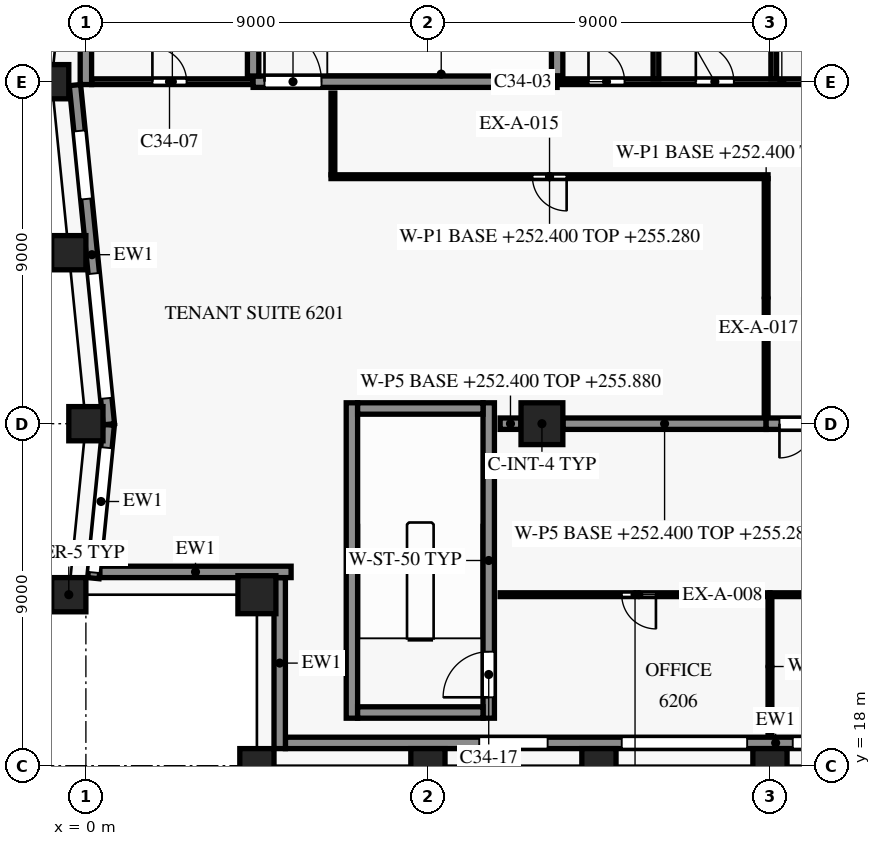
"""IFC4 building model, lengths in metres.
Left out: names, types, materials, properties, quantities, classifications, styles, units other than length and angle.
Written with IfcOpenShell. Run it as: python <this file> out.ifc"""

import sys

from ifc_helpers import new_model, si_unit, direction, frame, frame_2d, origin, origin_2d, place, context, subcontext, project, spatial, rectangle, extrude, element, fill, save


model = new_model("IFC4")
c1 = context("Model", 3, precision=1e-05, world=origin(), true_north=direction((0.0, 1.0)))
c2 = subcontext(c1, "Body", "Model", "MODEL_VIEW")
j1 = project(units=[si_unit("LENGTHUNIT", "METRE"), si_unit("PLANEANGLEUNIT", "RADIAN")], contexts=[c1])
p1 = place(None, origin())
s1 = spatial("IfcSite", under=j1, at=p1, CompositionType="ELEMENT")
p2 = place(p1, origin())
s2 = spatial("IfcBuilding", under=s1, at=p2, CompositionType="ELEMENT")
p3 = place(p2, frame((0.0, 0.0, 252.4)))
s3 = spatial("IfcBuildingStorey", under=s2, at=p3, CompositionType="ELEMENT", Elevation=252.4)
for number, where, z_axis, x_axis in (
    (1, (4.5, 18.0, 0.0), (0.0, 0.0, 1.0), (1.0, 0.0, 0.0)),
    (2, (9.0, 18.0, 0.0), (0.0, 0.0, 1.0), (1.0, 0.0, 0.0)),
    (3, (13.5, 18.0, 0.0), (0.0, 0.0, 1.0), (1.0, 0.0, 0.0)),
    (4, (18.0, 18.0, 0.0), (0.0, 0.0, 1.0), (1.0, 0.0, 0.0)),
    (5, (-0.9, 36.0, 0.0), (0.0, 0.0, 1.0), (0.0, -1.0, 0.0)),
    (6, (-0.45, 31.5, 0.0), (0.0, 0.0, 1.0), (0.1, -0.995, 0.0)),
    (7, (0.0, 27.0, 0.0), (0.0, 0.0, 1.0), (0.0, -1.0, 0.0)),
    (8, (-0.45, 22.5, 0.0), (0.0, 0.0, 1.0), (-0.1, -0.995, 0.0)),
):
    element("IfcColumn", number, at=place(p3, frame(where, z_axis=z_axis, x_axis=x_axis)), inside=s3, PredefinedType="COLUMN", context=c2, shape_type="SweptSolid", body=[
        extrude(rectangle(XDim=0.9, YDim=0.9, at=origin_2d()), origin(), (0.0, 0.0, 1.0), 3.8),
    ])
p4 = place(p3, frame((4.5, 22.5, 0.0), z_axis=(0.0, 0.0, 1.0), x_axis=(1.0, 0.0, 0.0)))
e9 = element("IfcColumn", 9, at=p4, inside=s3, PredefinedType="COLUMN", context=c2, shape_type="SweptSolid", body=[
    extrude(rectangle(XDim=1.0, YDim=1.0, at=origin_2d()), origin(), (0.0, 0.0, 1.0), 3.8),
])
p5 = place(p3, frame((12.0, 27.0, 0.0), z_axis=(0.0, 0.0, 1.0), x_axis=(1.0, 0.0, 0.0)))
e10 = element("IfcColumn", 10, at=p5, inside=s3, PredefinedType="COLUMN", context=c2, shape_type="SweptSolid", body=[
    extrude(rectangle(XDim=1.1, YDim=1.1, at=origin_2d()), origin(), (0.0, 0.0, 1.0), 3.8),
])
p6 = place(p3, frame((31.05, 18.6, 0.0), z_axis=(0.0, 0.0, 1.0), x_axis=(-1.0, 0.0, 0.0)))
e11 = element("IfcWall", 11, at=p6, inside=s3, PredefinedType="SOLIDWALL", context=c2, shape_type="SweptSolid", body=[
    extrude(rectangle(XDim=25.8, YDim=0.3, at=frame_2d((12.9, 0.0))), origin(), (0.0, 0.0, 1.0), 3.15),
])
p7 = place(p6, frame((0.9, 0.0, 0.75)))
e12 = element("IfcOpeningElement", 12, at=p7, cuts=e11, PredefinedType="OPENING", context=c2, shape_type="SweptSolid", body=[
    extrude(rectangle(XDim=1.8, YDim=1.8, at=frame_2d((0.9, 0.9))), frame((0.0, 0.16, 0.0), z_axis=(0.0, -1.0, 0.0), x_axis=(1.0, 0.0, 0.0)), (0.0, 0.0, 1.0), 0.32),
])
p8 = place(p6, frame((5.4, 0.0, 0.75)))
e13 = element("IfcOpeningElement", 13, at=p8, cuts=e11, PredefinedType="OPENING", context=c2, shape_type="SweptSolid", body=[
    extrude(rectangle(XDim=1.8, YDim=1.8, at=frame_2d((0.9, 0.9))), frame((0.0, 0.16, 0.0), z_axis=(0.0, -1.0, 0.0), x_axis=(1.0, 0.0, 0.0)), (0.0, 0.0, 1.0), 0.32),
])
p9 = place(p6, frame((9.15, 0.0, 0.15)))
e14 = element("IfcOpeningElement", 14, at=p9, cuts=e11, PredefinedType="OPENING", context=c2, shape_type="SweptSolid", body=[
    extrude(rectangle(XDim=3.3, YDim=2.4, at=frame_2d((1.65, 1.2))), frame((0.0, 0.16, 0.0), z_axis=(0.0, -1.0, 0.0), x_axis=(1.0, 0.0, 0.0)), (0.0, 0.0, 1.0), 0.32),
])
p10 = place(p6, frame((13.65, 0.0, 0.15)))
e15 = element("IfcOpeningElement", 15, at=p10, cuts=e11, PredefinedType="OPENING", context=c2, shape_type="SweptSolid", body=[
    extrude(rectangle(XDim=3.3, YDim=2.4, at=frame_2d((1.65, 1.2))), frame((0.0, 0.16, 0.0), z_axis=(0.0, -1.0, 0.0), x_axis=(1.0, 0.0, 0.0)), (0.0, 0.0, 1.0), 0.32),
])
p11 = place(p6, frame((18.9, 0.0, 0.75)))
e16 = element("IfcOpeningElement", 16, at=p11, cuts=e11, PredefinedType="OPENING", context=c2, shape_type="SweptSolid", body=[
    extrude(rectangle(XDim=1.8, YDim=1.8, at=frame_2d((0.9, 0.9))), frame((0.0, 0.16, 0.0), z_axis=(0.0, -1.0, 0.0), x_axis=(1.0, 0.0, 0.0)), (0.0, 0.0, 1.0), 0.32),
])
p12 = place(p3, frame((0.604, 26.985, 0.0), z_axis=(0.0, 0.0, 1.0), x_axis=(-0.099509108728, 0.995036651225, 0.0)))
e17 = element("IfcWall", 17, at=p12, inside=s3, PredefinedType="SOLIDWALL", context=c2, shape_type="SweptSolid", body=[
    extrude(rectangle(XDim=8.97, YDim=0.3, at=frame_2d((4.485, 0.0))), origin(), (0.0, 0.0, 1.0), 3.15),
])
p13 = place(p12, frame((0.686, 0.0, 0.15)))
e18 = element("IfcOpeningElement", 18, at=p13, cuts=e17, PredefinedType="OPENING", context=c2, shape_type="SweptSolid", body=[
    extrude(rectangle(XDim=3.3, YDim=2.4, at=frame_2d((1.65, 1.2))), frame((0.0, 0.16, 0.0), z_axis=(0.0, -1.0, 0.0), x_axis=(1.0, 0.0, 0.0)), (0.0, 0.0, 1.0), 0.32),
])
p14 = place(p12, frame((5.958, 0.0, 0.75)))
e19 = element("IfcOpeningElement", 19, at=p14, cuts=e17, PredefinedType="OPENING", context=c2, shape_type="SweptSolid", body=[
    extrude(rectangle(XDim=1.8, YDim=1.8, at=frame_2d((0.9, 0.9))), frame((0.0, 0.16, 0.0), z_axis=(0.0, -1.0, 0.0), x_axis=(1.0, 0.0, 0.0)), (0.0, 0.0, 1.0), 0.32),
])
p15 = place(p3, frame((0.197, 22.935, 0.0), z_axis=(0.0, 0.0, 1.0), x_axis=(0.09951564041, 0.995035997999, 0.0)))
e20 = element("IfcWall", 20, at=p15, inside=s3, PredefinedType="SOLIDWALL", context=c2, shape_type="SweptSolid", body=[
    extrude(rectangle(XDim=4.055, YDim=0.3, at=frame_2d((2.028, 0.0))), origin(), (0.0, 0.0, 1.0), 3.15),
])
p16 = place(p15, frame((0.15, 0.0, 0.15)))
e21 = element("IfcOpeningElement", 21, at=p16, cuts=e20, PredefinedType="OPENING", context=c2, shape_type="SweptSolid", body=[
    extrude(rectangle(XDim=3.3, YDim=2.4, at=frame_2d((1.65, 1.2))), frame((0.0, 0.16, 0.0), z_axis=(0.0, -1.0, 0.0), x_axis=(1.0, 0.0, 0.0)), (0.0, 0.0, 1.0), 0.32),
])
p17 = place(p3, frame((5.4, 23.1, 0.0), z_axis=(0.0, 0.0, 1.0), x_axis=(-1.0, 0.0, 0.0)))
e22 = element("IfcWall", 22, at=p17, inside=s3, PredefinedType="SOLIDWALL", context=c2, shape_type="SweptSolid", body=[
    extrude(rectangle(XDim=5.031, YDim=0.3, at=frame_2d((2.516, 0.0))), origin(), (0.0, 0.0, 1.0), 3.15),
])
p18 = place(p3, frame((5.1, 18.45, 0.0), z_axis=(0.0, 0.0, 1.0), x_axis=(0.0, 1.0, 0.0)))
e23 = element("IfcWall", 23, at=p18, inside=s3, PredefinedType="SOLIDWALL", context=c2, shape_type="SweptSolid", body=[
    extrude(rectangle(XDim=4.5, YDim=0.3, at=frame_2d((2.25, 0.0))), origin(), (0.0, 0.0, 1.0), 3.15),
])
for number, where, z_axis, x_axis in (
    (24, (7.15, 19.4, 0.0), (0.0, 0.0, 1.0), (1.0, 0.0, 0.0)),
    (25, (7.15, 27.4, 0.0), (0.0, 0.0, 1.0), (1.0, 0.0, 0.0)),
):
    element("IfcWall", number, at=place(p3, frame(where, z_axis=z_axis, x_axis=x_axis)), inside=s3, PredefinedType="SHEAR", context=c2, shape_type="SweptSolid", body=[
        extrude(rectangle(XDim=3.3, YDim=0.3, at=frame_2d((1.65, 0.0))), origin(), (0.0, 0.0, 1.0), 3.5),
    ])
p19 = place(p3, frame((0.15, 36.0, 0.0), z_axis=(0.0, 0.0, 1.0), x_axis=(1.0, 0.0, 0.0)))
e26 = element("IfcWall", 26, at=p19, inside=s3, PredefinedType="PARTITIONING", context=c2, shape_type="SweptSolid", body=[
    extrude(rectangle(XDim=4.25, YDim=0.15, at=frame_2d((2.125, 0.0))), origin(), (0.0, 0.0, 1.0), 3.5),
])
p20 = place(p19, frame((1.6, 0.0, 0.0)))
e27 = element("IfcOpeningElement", 27, at=p20, cuts=e26, PredefinedType="OPENING", context=c2, shape_type="SweptSolid", body=[
    extrude(rectangle(XDim=0.9, YDim=2.1, at=frame_2d((0.45, 1.05))), frame((0.0, 0.085, 0.0), z_axis=(0.0, -1.0, 0.0), x_axis=(1.0, 0.0, 0.0)), (0.0, 0.0, 1.0), 0.17),
])
p21 = place(p3, frame((12.4, 36.0, 0.0), z_axis=(0.0, 0.0, 1.0), x_axis=(1.0, 0.0, 0.0)))
e28 = element("IfcWall", 28, at=p21, inside=s3, PredefinedType="SHEAR", context=c2, shape_type="SweptSolid", body=[
    extrude(rectangle(XDim=11.825, YDim=0.15, at=frame_2d((5.913, 0.0))), origin(), (0.0, 0.0, 1.0), 3.5),
])
p22 = place(p21, frame((0.825, 0.0, 0.0)))
e29 = element("IfcOpeningElement", 29, at=p22, cuts=e28, PredefinedType="OPENING", context=c2, shape_type="SweptSolid", body=[
    extrude(rectangle(XDim=0.95, YDim=2.1, at=frame_2d((0.475, 1.05))), frame((0.0, 0.085, 0.0), z_axis=(0.0, -1.0, 0.0), x_axis=(1.0, 0.0, 0.0)), (0.0, 0.0, 1.0), 0.17),
])
p23 = place(p21, frame((3.65, 0.0, 0.0)))
e30 = element("IfcOpeningElement", 30, at=p23, cuts=e28, PredefinedType="OPENING", context=c2, shape_type="SweptSolid", body=[
    extrude(rectangle(XDim=1.0, YDim=2.1, at=frame_2d((0.5, 1.05))), frame((0.0, 0.085, 0.0), z_axis=(0.0, -1.0, 0.0), x_axis=(1.0, 0.0, 0.0)), (0.0, 0.0, 1.0), 0.17),
])
p24 = place(p21, frame((6.8, 0.0, 0.0)))
e31 = element("IfcOpeningElement", 31, at=p24, cuts=e28, PredefinedType="OPENING", context=c2, shape_type="SweptSolid", body=[
    extrude(rectangle(XDim=0.9, YDim=2.1, at=frame_2d((0.45, 1.05))), frame((0.0, 0.085, 0.0), z_axis=(0.0, -1.0, 0.0), x_axis=(1.0, 0.0, 0.0)), (0.0, 0.0, 1.0), 0.17),
])
p25 = place(p21, frame((9.9, 0.0, 0.0)))
e32 = element("IfcOpeningElement", 32, at=p25, cuts=e28, PredefinedType="OPENING", context=c2, shape_type="SweptSolid", body=[
    extrude(rectangle(XDim=0.9, YDim=2.1, at=frame_2d((0.45, 1.05))), frame((0.0, 0.085, 0.0), z_axis=(0.0, -1.0, 0.0), x_axis=(1.0, 0.0, 0.0)), (0.0, 0.0, 1.0), 0.17),
])
p26 = place(p3, frame((4.4, 36.0, 0.0), z_axis=(0.0, 0.0, 1.0), x_axis=(1.0, 0.0, 0.0)))
e33 = element("IfcWall", 33, at=p26, inside=s3, PredefinedType="SHEAR", context=c2, shape_type="SweptSolid", body=[
    extrude(rectangle(XDim=8.0, YDim=0.3, at=frame_2d((4.0, 0.0))), origin(), (0.0, 0.0, 1.0), 3.5),
])
p27 = place(p26, frame((0.3, 0.0, 0.0)))
e34 = element("IfcOpeningElement", 34, at=p27, cuts=e33, PredefinedType="OPENING", context=c2, shape_type="SweptSolid", body=[
    extrude(rectangle(XDim=1.5, YDim=2.2, at=frame_2d((0.75, 1.1))), frame((0.0, 0.16, 0.0), z_axis=(0.0, -1.0, 0.0), x_axis=(1.0, 0.0, 0.0)), (0.0, 0.0, 1.0), 0.32),
])
p28 = place(p3, frame((0.0, 35.925, 0.0), z_axis=(0.0, 0.0, 1.0), x_axis=(0.0, 1.0, 0.0)))
e35 = element("IfcWall", 35, at=p28, inside=s3, PredefinedType="SHEAR", context=c2, shape_type="SweptSolid", body=[
    extrude(rectangle(XDim=4.075, YDim=0.3, at=frame_2d((2.038, 0.0))), origin(), (0.0, 0.0, 1.0), 3.5),
])
p29 = place(p3, frame((4.4, 36.15, 0.0), z_axis=(0.0, 0.0, 1.0), x_axis=(0.0, 1.0, 0.0)))
e36 = element("IfcWall", 36, at=p29, inside=s3, PredefinedType="SHEAR", context=c2, shape_type="SweptSolid", body=[
    extrude(rectangle(XDim=3.725, YDim=0.3, at=frame_2d((1.863, 0.0))), origin(), (0.0, 0.0, 1.0), 3.5),
])
p30 = place(p3, frame((7.0, 19.25, 0.0), z_axis=(0.0, 0.0, 1.0), x_axis=(0.0, 1.0, 0.0)))
e37 = element("IfcWall", 37, at=p30, inside=s3, PredefinedType="SHEAR", context=c2, shape_type="SweptSolid", body=[
    extrude(rectangle(XDim=8.3, YDim=0.3, at=frame_2d((4.15, 0.0))), origin(), (0.0, 0.0, 1.0), 3.5),
])
p31 = place(p3, frame((10.6, 19.25, 0.0), z_axis=(0.0, 0.0, 1.0), x_axis=(0.0, 1.0, 0.0)))
e38 = element("IfcWall", 38, at=p31, inside=s3, PredefinedType="SHEAR", context=c2, shape_type="SweptSolid", body=[
    extrude(rectangle(XDim=8.3, YDim=0.3, at=frame_2d((4.15, 0.0))), origin(), (0.0, 0.0, 1.0), 3.5),
])
p32 = place(p31, frame((0.55, 0.0, 0.0)))
e39 = element("IfcOpeningElement", 39, at=p32, cuts=e38, PredefinedType="OPENING", context=c2, shape_type="SweptSolid", body=[
    extrude(rectangle(XDim=1.2, YDim=2.2, at=frame_2d((0.6, 1.1))), frame((0.0, 0.16, 0.0), z_axis=(0.0, -1.0, 0.0), x_axis=(1.0, 0.0, 0.0)), (0.0, 0.0, 1.0), 0.32),
])
p33 = place(p3, frame((12.4, 36.15, 0.0), z_axis=(0.0, 0.0, 1.0), x_axis=(0.0, 1.0, 0.0)))
e40 = element("IfcWall", 40, at=p33, inside=s3, PredefinedType="SHEAR", context=c2, shape_type="SweptSolid", body=[
    extrude(rectangle(XDim=3.45, YDim=0.3, at=frame_2d((1.725, 0.0))), origin(), (0.0, 0.0, 1.0), 3.5),
])
for number, where, z_axis, x_axis in (
    (41, (15.0, 36.075, 0.0), (0.0, 0.0, 1.0), (0.0, 1.0, 0.0)),
    (42, (18.1, 36.075, 0.0), (0.0, 0.0, 1.0), (0.0, 1.0, 0.0)),
):
    element("IfcWall", number, at=place(p3, frame(where, z_axis=z_axis, x_axis=x_axis)), inside=s3, PredefinedType="PARTITIONING", context=c2, shape_type="SweptSolid", body=[
        extrude(rectangle(XDim=3.85, YDim=0.15, at=frame_2d((1.925, 0.0))), origin(), (0.0, 0.0, 1.0), 3.5),
    ])
p34 = place(p3, frame((18.0, 18.77, 0.0), z_axis=(0.0, 0.0, 1.0), x_axis=(0.0, 1.0, 0.0)))
e43 = element("IfcWall", 43, at=p34, inside=s3, PredefinedType="PARTITIONING", context=c2, shape_type="SweptSolid", body=[
    extrude(rectangle(XDim=3.68, YDim=0.1, at=frame_2d((1.84, 0.0))), origin(), (0.0, 0.0, 1.0), 3.48),
])
p35 = place(p3, frame((18.0, 22.5, 0.0), z_axis=(0.0, 0.0, 1.0), x_axis=(-1.0, 0.0, 0.0)))
e44 = element("IfcWall", 44, at=p35, inside=s3, PredefinedType="PARTITIONING", context=c2, shape_type="SweptSolid", body=[
    extrude(rectangle(XDim=7.1, YDim=0.1, at=frame_2d((3.55, 0.0))), origin(), (0.0, 0.0, 1.0), 2.88),
])
p36 = place(p35, frame((3.0, 0.0, 0.0)))
e45 = element("IfcOpeningElement", 45, at=p36, cuts=e44, PredefinedType="OPENING", context=c2, shape_type="SweptSolid", body=[
    extrude(rectangle(XDim=0.9, YDim=2.1, at=frame_2d((0.45, 1.05))), frame((0.0, 0.06, 0.0), z_axis=(0.0, -1.0, 0.0), x_axis=(1.0, 0.0, 0.0)), (0.0, 0.0, 1.0), 0.12),
])
p37 = place(p3, frame((22.5, 22.5, 0.0), z_axis=(0.0, 0.0, 1.0), x_axis=(-1.0, 0.0, 0.0)))
e46 = element("IfcWall", 46, at=p37, inside=s3, PredefinedType="PARTITIONING", context=c2, shape_type="SweptSolid", body=[
    extrude(rectangle(XDim=4.5, YDim=0.1, at=frame_2d((2.25, 0.0))), origin(), (0.0, 0.0, 1.0), 3.48),
])
p38 = place(p37, frame((1.8, 0.0, 0.0)))
e47 = element("IfcOpeningElement", 47, at=p38, cuts=e46, PredefinedType="OPENING", context=c2, shape_type="SweptSolid", body=[
    extrude(rectangle(XDim=0.9, YDim=2.1, at=frame_2d((0.45, 1.05))), frame((0.0, 0.06, 0.0), z_axis=(0.0, -1.0, 0.0), x_axis=(1.0, 0.0, 0.0)), (0.0, 0.0, 1.0), 0.12),
])
p39 = place(p3, frame((10.9, 27.0, 0.0), z_axis=(0.0, 0.0, 1.0), x_axis=(1.0, 0.0, 0.0)))
e48 = element("IfcWall", 48, at=p39, inside=s3, PredefinedType="PARTITIONING", context=c2, shape_type="SweptSolid", body=[
    extrude(rectangle(XDim=0.545, YDim=0.3, at=frame_2d((0.272, 0.0))), origin(), (0.0, 0.0, 1.0), 3.48),
])
p40 = place(p3, frame((12.555, 27.0, 0.0), z_axis=(0.0, 0.0, 1.0), x_axis=(1.0, 0.0, 0.0)))
e49 = element("IfcWall", 49, at=p40, inside=s3, PredefinedType="PARTITIONING", context=c2, shape_type="SweptSolid", body=[
    extrude(rectangle(XDim=5.345, YDim=0.3, at=frame_2d((2.672, 0.0))), origin(), (0.0, 0.0, 1.0), 2.88),
])
p41 = place(p3, frame((20.4, 27.0, 0.0), z_axis=(0.0, 0.0, 1.0), x_axis=(-1.0, 0.0, 0.0)))
e50 = element("IfcWall", 50, at=p41, inside=s3, PredefinedType="PARTITIONING", context=c2, shape_type="SweptSolid", body=[
    extrude(rectangle(XDim=2.5, YDim=0.3, at=frame_2d((1.25, 0.0))), origin(), (0.0, 0.0, 1.0), 2.88),
])
p42 = place(p41, frame((0.35, 0.0, 0.0)))
e51 = element("IfcOpeningElement", 51, at=p42, cuts=e50, PredefinedType="OPENING", context=c2, shape_type="SweptSolid", body=[
    extrude(rectangle(XDim=1.8, YDim=2.1, at=frame_2d((0.9, 1.05))), frame((0.0, 0.16, 0.0), z_axis=(0.0, -1.0, 0.0), x_axis=(1.0, 0.0, 0.0)), (0.0, 0.0, 1.0), 0.32),
])
p43 = place(p3, frame((17.9, 27.17, 0.0), z_axis=(0.0, 0.0, 1.0), x_axis=(0.0, 1.0, 0.0)))
e52 = element("IfcWall", 52, at=p43, inside=s3, PredefinedType="PARTITIONING", context=c2, shape_type="SweptSolid", body=[
    extrude(rectangle(XDim=6.28, YDim=0.1, at=frame_2d((3.14, 0.0))), origin(), (0.0, 0.0, 1.0), 2.88),
])
p44 = place(p3, frame((17.95, 33.5, 0.0), z_axis=(0.0, 0.0, 1.0), x_axis=(-1.0, 0.0, 0.0)))
e53 = element("IfcWall", 53, at=p44, inside=s3, PredefinedType="PARTITIONING", context=c2, shape_type="SweptSolid", body=[
    extrude(rectangle(XDim=11.5, YDim=0.1, at=frame_2d((5.75, 0.0))), origin(), (0.0, 0.0, 1.0), 2.88),
])
p45 = place(p44, frame((5.3, 0.0, 0.0)))
e54 = element("IfcOpeningElement", 54, at=p45, cuts=e53, PredefinedType="OPENING", context=c2, shape_type="SweptSolid", body=[
    extrude(rectangle(XDim=0.9, YDim=2.1, at=frame_2d((0.45, 1.05))), frame((0.0, 0.06, 0.0), z_axis=(0.0, -1.0, 0.0), x_axis=(1.0, 0.0, 0.0)), (0.0, 0.0, 1.0), 0.12),
])
p46 = place(p3, frame((6.5, 33.55, 0.0), z_axis=(0.0, 0.0, 1.0), x_axis=(0.0, 1.0, 0.0)))
e55 = element("IfcWall", 55, at=p46, inside=s3, PredefinedType="PARTITIONING", context=c2, shape_type="SweptSolid", body=[
    extrude(rectangle(XDim=2.15, YDim=0.1, at=frame_2d((1.075, 0.0))), origin(), (0.0, 0.0, 1.0), 3.48),
])
p47 = place(p9, origin())
e56 = element("IfcWindow", 56, at=p47, inside=s3, PartitioningType="SINGLE_PANEL", PredefinedType="WINDOW", context=c2, shape_type="SweptSolid", body=[
    extrude(rectangle(XDim=3.3, YDim=2.4, at=frame_2d((1.65, 1.2))), frame((0.0, 0.03, 0.0), z_axis=(0.0, -1.0, 0.0), x_axis=(1.0, 0.0, 0.0)), (0.0, 0.0, 1.0), 0.06),
])
fill(e14, e56)
p48 = place(p10, origin())
e57 = element("IfcWindow", 57, at=p48, inside=s3, PartitioningType="SINGLE_PANEL", PredefinedType="WINDOW", context=c2, shape_type="SweptSolid", body=[
    extrude(rectangle(XDim=3.3, YDim=2.4, at=frame_2d((1.65, 1.2))), frame((0.0, 0.03, 0.0), z_axis=(0.0, -1.0, 0.0), x_axis=(1.0, 0.0, 0.0)), (0.0, 0.0, 1.0), 0.06),
])
fill(e15, e57)
p49 = place(p11, origin())
e58 = element("IfcWindow", 58, at=p49, inside=s3, PartitioningType="SINGLE_PANEL", PredefinedType="WINDOW", context=c2, shape_type="SweptSolid", body=[
    extrude(rectangle(XDim=1.8, YDim=1.8, at=frame_2d((0.9, 0.9))), frame((0.0, 0.03, 0.0), z_axis=(0.0, -1.0, 0.0), x_axis=(1.0, 0.0, 0.0)), (0.0, 0.0, 1.0), 0.06),
])
fill(e16, e58)
p50 = place(p13, origin())
e59 = element("IfcWindow", 59, at=p50, inside=s3, PartitioningType="SINGLE_PANEL", PredefinedType="WINDOW", context=c2, shape_type="SweptSolid", body=[
    extrude(rectangle(XDim=3.3, YDim=2.4, at=frame_2d((1.65, 1.2))), frame((0.0, 0.03, 0.0), z_axis=(0.0, -1.0, 0.0), x_axis=(1.0, 0.0, 0.0)), (0.0, 0.0, 1.0), 0.06),
])
fill(e18, e59)
p51 = place(p14, origin())
e60 = element("IfcWindow", 60, at=p51, inside=s3, PartitioningType="SINGLE_PANEL", PredefinedType="WINDOW", context=c2, shape_type="SweptSolid", body=[
    extrude(rectangle(XDim=1.8, YDim=1.8, at=frame_2d((0.9, 0.9))), frame((0.0, 0.03, 0.0), z_axis=(0.0, -1.0, 0.0), x_axis=(1.0, 0.0, 0.0)), (0.0, 0.0, 1.0), 0.06),
])
fill(e19, e60)
p52 = place(p16, origin())
e61 = element("IfcWindow", 61, at=p52, inside=s3, PartitioningType="SINGLE_PANEL", PredefinedType="WINDOW", context=c2, shape_type="SweptSolid", body=[
    extrude(rectangle(XDim=3.3, YDim=2.4, at=frame_2d((1.65, 1.2))), frame((0.0, 0.03, 0.0), z_axis=(0.0, -1.0, 0.0), x_axis=(1.0, 0.0, 0.0)), (0.0, 0.0, 1.0), 0.06),
])
fill(e21, e61)
p53 = place(p22, origin())
e62 = element("IfcDoor", 62, at=p53, inside=s3, OperationType="SINGLE_SWING_RIGHT", PredefinedType="DOOR", context=c2, shape_type="SweptSolid", body=[
    extrude(rectangle(XDim=0.95, YDim=2.1, at=frame_2d((0.475, 1.05))), frame((0.0, 0.025, 0.0), z_axis=(0.0, -1.0, 0.0), x_axis=(1.0, 0.0, 0.0)), (0.0, 0.0, 1.0), 0.05),
])
fill(e29, e62)
p54 = place(p23, origin())
e63 = element("IfcDoor", 63, at=p54, inside=s3, OperationType="SINGLE_SWING_LEFT", PredefinedType="DOOR", context=c2, shape_type="SweptSolid", body=[
    extrude(rectangle(XDim=1.0, YDim=2.1, at=frame_2d((0.5, 1.05))), frame((0.0, 0.025, 0.0), z_axis=(0.0, -1.0, 0.0), x_axis=(1.0, 0.0, 0.0)), (0.0, 0.0, 1.0), 0.05),
])
fill(e30, e63)
p55 = place(p20, origin())
e64 = element("IfcDoor", 64, at=p55, inside=s3, OperationType="SINGLE_SWING_LEFT", PredefinedType="DOOR", context=c2, shape_type="SweptSolid", body=[
    extrude(rectangle(XDim=0.9, YDim=2.1, at=frame_2d((0.45, 1.05))), frame((0.0, 0.025, 0.0), z_axis=(0.0, -1.0, 0.0), x_axis=(1.0, 0.0, 0.0)), (0.0, 0.0, 1.0), 0.05),
])
fill(e27, e64)
p56 = place(p27, origin())
e65 = element("IfcDoor", 65, at=p56, inside=s3, OperationType="SINGLE_SWING_RIGHT", PredefinedType="DOOR", context=c2, shape_type="SweptSolid", body=[
    extrude(rectangle(XDim=1.5, YDim=2.2, at=frame_2d((0.75, 1.1))), frame((0.0, 0.025, 0.0), z_axis=(0.0, -1.0, 0.0), x_axis=(1.0, 0.0, 0.0)), (0.0, 0.0, 1.0), 0.05),
])
fill(e34, e65)
p57 = place(p32, origin())
e66 = element("IfcDoor", 66, at=p57, inside=s3, OperationType="SINGLE_SWING_RIGHT", PredefinedType="DOOR", context=c2, shape_type="SweptSolid", body=[
    extrude(rectangle(XDim=1.2, YDim=2.2, at=frame_2d((0.6, 1.1))), frame((0.0, 0.025, 0.0), z_axis=(0.0, -1.0, 0.0), x_axis=(1.0, 0.0, 0.0)), (0.0, 0.0, 1.0), 0.05),
])
fill(e39, e66)
p58 = place(p36, origin())
e67 = element("IfcDoor", 67, at=p58, inside=s3, OperationType="SINGLE_SWING_LEFT", PredefinedType="DOOR", context=c2, shape_type="SweptSolid", body=[
    extrude(rectangle(XDim=0.9, YDim=2.1, at=frame_2d((0.45, 1.05))), frame((0.0, 0.025, 0.0), z_axis=(0.0, -1.0, 0.0), x_axis=(1.0, 0.0, 0.0)), (0.0, 0.0, 1.0), 0.05),
])
fill(e45, e67)
p59 = place(p45, origin())
e68 = element("IfcDoor", 68, at=p59, inside=s3, OperationType="SINGLE_SWING_LEFT", PredefinedType="DOOR", context=c2, shape_type="SweptSolid", body=[
    extrude(rectangle(XDim=0.9, YDim=2.1, at=frame_2d((0.45, 1.05))), frame((0.0, 0.025, 0.0), z_axis=(0.0, -1.0, 0.0), x_axis=(1.0, 0.0, 0.0)), (0.0, 0.0, 1.0), 0.05),
])
fill(e54, e68)
p60 = place(p42, origin())
e69 = element("IfcDoor", 69, at=p60, inside=s3, OperationType="DOUBLE_DOOR_SINGLE_SWING", PredefinedType="DOOR", context=c2, shape_type="SweptSolid", body=[
    extrude(rectangle(XDim=1.8, YDim=2.1, at=frame_2d((0.9, 1.05))), frame((0.0, 0.025, 0.0), z_axis=(0.0, -1.0, 0.0), x_axis=(1.0, 0.0, 0.0)), (0.0, 0.0, 1.0), 0.05),
])
fill(e51, e69)
save(model, sys.argv[1])
